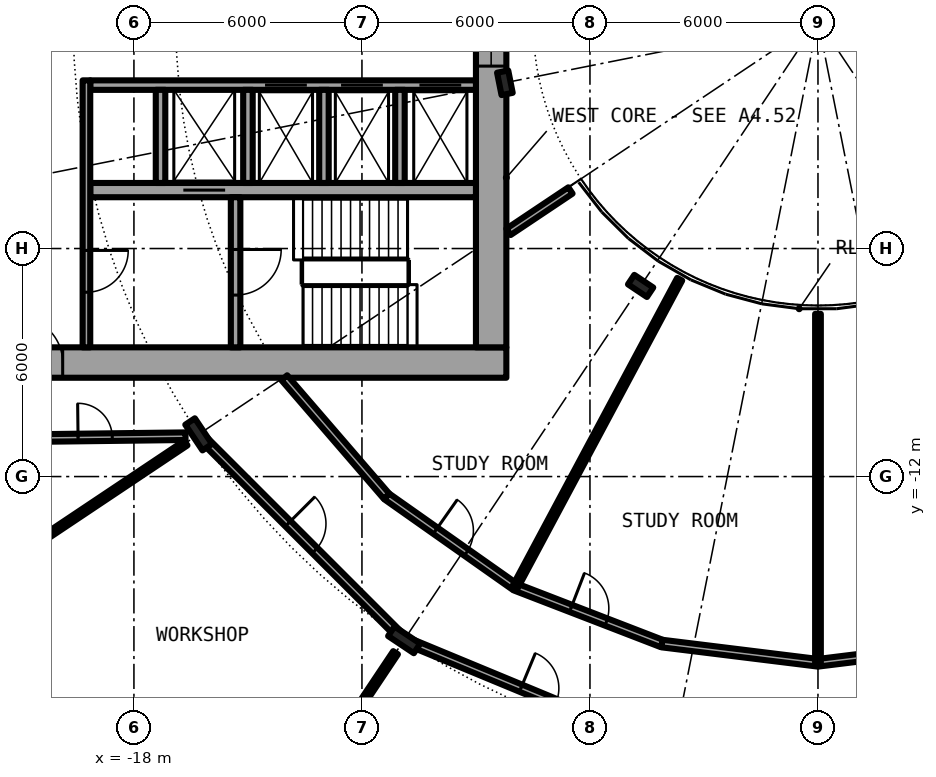
"""IFC4 building model, lengths in metres.
Left out: names, types, materials, properties, quantities, classifications, styles, units other than length and angle.
Written with IfcOpenShell. Run it as: python <this file> out.ifc"""

import sys

from ifc_helpers import new_model, si_unit, direction, frame, frame_2d, origin, origin_2d, place, context, subcontext, project, spatial, rectangle, i_section, extrude, element, fill, save


model = new_model("IFC4")
c1 = context("Model", 3, precision=1e-05, world=origin(), true_north=direction((0.0, 1.0)))
c2 = subcontext(c1, "Body", "Model", "MODEL_VIEW")
j1 = project(units=[si_unit("LENGTHUNIT", "METRE"), si_unit("PLANEANGLEUNIT", "RADIAN")], contexts=[c1])
p1 = place(None, origin())
s1 = spatial("IfcSite", under=j1, at=p1, CompositionType="ELEMENT")
p2 = place(p1, origin())
s2 = spatial("IfcBuilding", under=s1, at=p2, CompositionType="ELEMENT")
p3 = place(p2, frame((0.0, 0.0, 14.1)))
s3 = spatial("IfcBuildingStorey", under=s2, at=p3, CompositionType="ELEMENT", Elevation=14.1)
for number, where, z_axis, x_axis in (
    (1, (-16.297, -10.889, 0.0), (0.0, 0.0, 1.0), (-0.831, -0.556, 0.0)),
    (2, (-10.889, -16.297, 0.0), (0.0, 0.0, 1.0), (-0.556, -0.831, 0.0)),
):
    element("IfcColumn", number, at=place(p3, frame(where, z_axis=z_axis, x_axis=x_axis)), inside=s3, PredefinedType="COLUMN", context=c2, shape_type="SweptSolid", body=[
        extrude(i_section(OverallWidth=0.303, OverallDepth=0.814, WebThickness=0.021, FlangeThickness=0.04, FilletRadius=0.03, at=origin_2d()), origin(), (0.0, 0.0, 1.0), 4.2),
    ])
for number, where, z_axis, x_axis in (
    (3, (-8.239, -1.639, 0.0), (0.0, 0.0, 1.0), (-0.981, -0.195, 0.0)),
    (4, (-4.667, -6.984, 0.0), (0.0, 0.0, 1.0), (-0.556, -0.831, 0.0)),
):
    element("IfcColumn", number, at=place(p3, frame(where, z_axis=z_axis, x_axis=x_axis)), inside=s3, PredefinedType="COLUMN", context=c2, shape_type="SweptSolid", body=[
        extrude(i_section(OverallWidth=0.3, OverallDepth=0.6, WebThickness=0.015, FlangeThickness=0.03, FilletRadius=0.027, at=origin_2d()), origin(), (0.0, 0.0, 1.0), 4.2),
    ])
p4 = place(p3, frame((-22.4, -9.0, 0.0), z_axis=(0.0, 0.0, 1.0), x_axis=(1.0, 0.0, 0.0)))
e5 = element("IfcWall", 5, at=p4, inside=s3, PredefinedType="SHEAR", context=c2, shape_type="SweptSolid", body=[
    extrude(rectangle(XDim=14.2, YDim=0.8, at=frame_2d((7.1, 0.0))), origin(), (0.0, 0.0, 1.0), 4.2),
])
p5 = place(p4, frame((1.325, 0.0, 0.0)))
e6 = element("IfcOpeningElement", 6, at=p5, cuts=e5, PredefinedType="OPENING", context=c2, shape_type="SweptSolid", body=[
    extrude(rectangle(XDim=1.2, YDim=2.3, at=frame_2d((0.6, 1.15))), frame((0.0, 0.41, 0.0), z_axis=(0.0, -1.0, 0.0), x_axis=(1.0, 0.0, 0.0)), (0.0, 0.0, 1.0), 0.82),
])
p6 = place(p3, frame((-8.6, 8.6, 0.0), z_axis=(0.0, 0.0, 1.0), x_axis=(0.0, -1.0, 0.0)))
e7 = element("IfcWall", 7, at=p6, inside=s3, PredefinedType="SHEAR", context=c2, shape_type="SweptSolid", body=[
    extrude(rectangle(XDim=17.2, YDim=0.8, at=frame_2d((8.6, 0.0))), origin(), (0.0, 0.0, 1.0), 4.2),
])
p7 = place(p6, frame((7.4, 0.0, 0.1)))
e8 = element("IfcOpeningElement", 8, at=p7, cuts=e7, PredefinedType="OPENING", context=c2, shape_type="SweptSolid", body=[
    extrude(rectangle(XDim=2.4, YDim=2.2, at=frame_2d((1.2, 1.1))), frame((0.0, 0.41, 0.0), z_axis=(0.0, -1.0, 0.0), x_axis=(1.0, 0.0, 0.0)), (0.0, 0.0, 1.0), 0.82),
])
p8 = place(p3, frame((-9.0, -1.7, 0.0), z_axis=(0.0, 0.0, 1.0), x_axis=(-1.0, 0.0, 0.0)))
e9 = element("IfcWall", 9, at=p8, inside=s3, PredefinedType="SHEAR", context=c2, shape_type="SweptSolid", body=[
    extrude(rectangle(XDim=10.15, YDim=0.25, at=frame_2d((5.075, 0.0))), origin(), (0.0, 0.0, 1.0), 4.2),
])
p9 = place(p8, frame((0.387, 0.0, 0.0)))
e10 = element("IfcOpeningElement", 10, at=p9, cuts=e9, PredefinedType="OPENING", context=c2, shape_type="SweptSolid", body=[
    extrude(rectangle(XDim=1.1, YDim=2.3, at=frame_2d((0.55, 1.15))), frame((0.0, 0.135, 0.0), z_axis=(0.0, -1.0, 0.0), x_axis=(1.0, 0.0, 0.0)), (0.0, 0.0, 1.0), 0.27),
])
p10 = place(p8, frame((2.45, 0.0, 0.0)))
e11 = element("IfcOpeningElement", 11, at=p10, cuts=e9, PredefinedType="OPENING", context=c2, shape_type="SweptSolid", body=[
    extrude(rectangle(XDim=1.1, YDim=2.3, at=frame_2d((0.55, 1.15))), frame((0.0, 0.135, 0.0), z_axis=(0.0, -1.0, 0.0), x_axis=(1.0, 0.0, 0.0)), (0.0, 0.0, 1.0), 0.27),
])
p11 = place(p8, frame((4.45, 0.0, 0.0)))
e12 = element("IfcOpeningElement", 12, at=p11, cuts=e9, PredefinedType="OPENING", context=c2, shape_type="SweptSolid", body=[
    extrude(rectangle(XDim=1.1, YDim=2.3, at=frame_2d((0.55, 1.15))), frame((0.0, 0.135, 0.0), z_axis=(0.0, -1.0, 0.0), x_axis=(1.0, 0.0, 0.0)), (0.0, 0.0, 1.0), 0.27),
])
p12 = place(p3, frame((-9.0, -4.462, 0.0), z_axis=(0.0, 0.0, 1.0), x_axis=(-1.0, 0.0, 0.0)))
e13 = element("IfcWall", 13, at=p12, inside=s3, PredefinedType="SHEAR", context=c2, shape_type="SweptSolid", body=[
    extrude(rectangle(XDim=10.15, YDim=0.375, at=frame_2d((5.075, 0.0))), origin(), (0.0, 0.0, 1.0), 4.2),
])
p13 = place(p12, frame((6.6, 0.0, 0.0)))
e14 = element("IfcOpeningElement", 14, at=p13, cuts=e13, PredefinedType="OPENING", context=c2, shape_type="SweptSolid", body=[
    extrude(rectangle(XDim=1.1, YDim=2.3, at=frame_2d((0.55, 1.15))), frame((0.0, 0.198, 0.0), z_axis=(0.0, -1.0, 0.0), x_axis=(1.0, 0.0, 0.0)), (0.0, 0.0, 1.0), 0.395),
])
p14 = place(p3, frame((-15.325, -4.65, 0.0), z_axis=(0.0, 0.0, 1.0), x_axis=(0.0, -1.0, 0.0)))
e15 = element("IfcWall", 15, at=p14, inside=s3, PredefinedType="SHEAR", context=c2, shape_type="SweptSolid", body=[
    extrude(rectangle(XDim=3.95, YDim=0.25, at=frame_2d((1.975, 0.0))), origin(), (0.0, 0.0, 1.0), 4.2),
])
p15 = place(p14, frame((1.375, 0.0, 0.0)))
e16 = element("IfcOpeningElement", 16, at=p15, cuts=e15, PredefinedType="OPENING", context=c2, shape_type="SweptSolid", body=[
    extrude(rectangle(XDim=1.2, YDim=2.3, at=frame_2d((0.6, 1.15))), frame((0.0, 0.135, 0.0), z_axis=(0.0, -1.0, 0.0), x_axis=(1.0, 0.0, 0.0)), (0.0, 0.0, 1.0), 0.27),
])
for number, where, z_axis, x_axis in (
    (17, (-15.0, -1.825, 0.0), (0.0, 0.0, 1.0), (0.0, -1.0, 0.0)),
    (18, (-17.3, -1.825, 0.0), (0.0, 0.0, 1.0), (0.0, -1.0, 0.0)),
):
    element("IfcWall", number, at=place(p3, frame(where, z_axis=z_axis, x_axis=x_axis)), inside=s3, PredefinedType="SOLIDWALL", context=c2, shape_type="SweptSolid", body=[
        extrude(rectangle(XDim=2.45, YDim=0.25, at=frame_2d((1.225, 0.0))), origin(), (0.0, 0.0, 1.0), 3.8),
    ])
p16 = place(p3, frame((-19.25, -1.575, 0.0), z_axis=(0.0, 0.0, 1.0), x_axis=(0.0, -1.0, 0.0)))
e19 = element("IfcWall", 19, at=p16, inside=s3, PredefinedType="SOLIDWALL", context=c2, shape_type="SweptSolid", body=[
    extrude(rectangle(XDim=7.025, YDim=0.2, at=frame_2d((3.513, 0.0))), origin(), (0.0, 0.0, 1.0), 3.8),
])
p17 = place(p16, frame((4.475, 0.0, 0.0)))
e20 = element("IfcOpeningElement", 20, at=p17, cuts=e19, PredefinedType="OPENING", context=c2, shape_type="SweptSolid", body=[
    extrude(rectangle(XDim=1.1, YDim=2.3, at=frame_2d((0.55, 1.15))), frame((0.0, 0.11, 0.0), z_axis=(0.0, -1.0, 0.0), x_axis=(1.0, 0.0, 0.0)), (0.0, 0.0, 1.0), 0.22),
])
for number, where, z_axis, x_axis in (
    (21, (-11.0, -1.825, 0.0), (0.0, 0.0, 1.0), (0.0, -1.0, 0.0)),
    (22, (-13.0, -1.825, 0.0), (0.0, 0.0, 1.0), (0.0, -1.0, 0.0)),
):
    element("IfcWall", number, at=place(p3, frame(where, z_axis=z_axis, x_axis=x_axis)), inside=s3, PredefinedType="SOLIDWALL", context=c2, shape_type="SweptSolid", body=[
        extrude(rectangle(XDim=2.45, YDim=0.25, at=frame_2d((1.225, 0.0))), origin(), (0.0, 0.0, 1.0), 3.8),
    ])
p18 = place(p3, frame((-16.188, -10.998, 0.0), z_axis=(0.0, 0.0, 1.0), x_axis=(0.707106781187, -0.707106781187, 0.0)))
e23 = element("IfcWall", 23, at=p18, inside=s3, PredefinedType="PARTITIONING", context=c2, shape_type="SweptSolid", body=[
    extrude(rectangle(XDim=7.34, YDim=0.2, at=frame_2d((3.67, 0.0))), origin(), (0.0, 0.0, 1.0), 3.38),
])
p19 = place(p18, frame((3.17, 0.0, 0.0)))
e24 = element("IfcOpeningElement", 24, at=p19, cuts=e23, PredefinedType="OPENING", context=c2, shape_type="SweptSolid", body=[
    extrude(rectangle(XDim=1.0, YDim=2.3, at=frame_2d((0.5, 1.15))), frame((0.0, 0.11, 0.0), z_axis=(0.0, -1.0, 0.0), x_axis=(1.0, 0.0, 0.0)), (0.0, 0.0, 1.0), 0.22),
])
p20 = place(p3, frame((-10.747, -16.356, 0.0), z_axis=(0.0, 0.0, 1.0), x_axis=(0.923912243701, -0.382604451019, 0.0)))
e25 = element("IfcWall", 25, at=p20, inside=s3, PredefinedType="PARTITIONING", context=c2, shape_type="SweptSolid", body=[
    extrude(rectangle(XDim=7.339, YDim=0.2, at=frame_2d((3.67, 0.0))), origin(), (0.0, 0.0, 1.0), 3.38),
])
p21 = place(p20, frame((3.17, 0.0, 0.0)))
e26 = element("IfcOpeningElement", 26, at=p21, cuts=e25, PredefinedType="OPENING", context=c2, shape_type="SweptSolid", body=[
    extrude(rectangle(XDim=1.0, YDim=2.3, at=frame_2d((0.5, 1.15))), frame((0.0, 0.11, 0.0), z_axis=(0.0, -1.0, 0.0), x_axis=(1.0, 0.0, 0.0)), (0.0, 0.0, 1.0), 0.22),
])
p22 = place(p3, frame((-14.043, -9.4, 0.0), z_axis=(0.0, 0.0, 1.0), x_axis=(0.653274518104, -0.757121129012, 0.0)))
e27 = element("IfcWall", 27, at=p22, inside=s3, PredefinedType="PARTITIONING", context=c2, shape_type="SweptSolid", body=[
    extrude(rectangle(XDim=4.124, YDim=0.2, at=frame_2d((2.062, 0.0))), origin(), (0.0, 0.0, 1.0), 3.8),
])
p23 = place(p3, frame((-11.349, -12.522, 0.0), z_axis=(0.0, 0.0, 1.0), x_axis=(0.817567680547, -0.575832517079, 0.0)))
e28 = element("IfcWall", 28, at=p23, inside=s3, PredefinedType="PARTITIONING", context=c2, shape_type="SweptSolid", body=[
    extrude(rectangle(XDim=4.137, YDim=0.2, at=frame_2d((2.068, 0.0))), origin(), (0.0, 0.0, 1.0), 3.8),
])
p24 = place(p23, frame((1.568, 0.0, 0.0)))
e29 = element("IfcOpeningElement", 29, at=p24, cuts=e28, PredefinedType="OPENING", context=c2, shape_type="SweptSolid", body=[
    extrude(rectangle(XDim=1.0, YDim=2.3, at=frame_2d((0.5, 1.15))), frame((0.0, 0.11, 0.0), z_axis=(0.0, -1.0, 0.0), x_axis=(1.0, 0.0, 0.0)), (0.0, 0.0, 1.0), 0.22),
])
p25 = place(p3, frame((-7.967, -14.904, 0.0), z_axis=(0.0, 0.0, 1.0), x_axis=(0.932943640288, -0.360022449363, 0.0)))
e30 = element("IfcWall", 30, at=p25, inside=s3, PredefinedType="PARTITIONING", context=c2, shape_type="SweptSolid", body=[
    extrude(rectangle(XDim=4.139, YDim=0.2, at=frame_2d((2.069, 0.0))), origin(), (0.0, 0.0, 1.0), 3.8),
])
p26 = place(p25, frame((1.569, 0.0, 0.0)))
e31 = element("IfcOpeningElement", 31, at=p26, cuts=e30, PredefinedType="OPENING", context=c2, shape_type="SweptSolid", body=[
    extrude(rectangle(XDim=1.0, YDim=2.3, at=frame_2d((0.5, 1.15))), frame((0.0, 0.11, 0.0), z_axis=(0.0, -1.0, 0.0), x_axis=(1.0, 0.0, 0.0)), (0.0, 0.0, 1.0), 0.22),
])
for number, where, z_axis, x_axis in (
    (32, (-4.106, -16.394, 0.0), (0.0, 0.0, 1.0), (0.992, -0.122, 0.0)),
    (33, (0.0, -16.9, 0.0), (0.0, 0.0, 1.0), (0.992, 0.122, 0.0)),
):
    element("IfcWall", number, at=place(p3, frame(where, z_axis=z_axis, x_axis=x_axis)), inside=s3, PredefinedType="PARTITIONING", context=c2, shape_type="SweptSolid", body=[
        extrude(rectangle(XDim=4.137, YDim=0.2, at=frame_2d((2.068, 0.0))), origin(), (0.0, 0.0, 1.0), 3.8),
    ])
p27 = place(p3, frame((-21.675, -11.0, 0.0), z_axis=(0.0, 0.0, 1.0), x_axis=(0.999924074118, 0.012322580895, 0.0)))
e34 = element("IfcWall", 34, at=p27, inside=s3, PredefinedType="PARTITIONING", context=c2, shape_type="SweptSolid", body=[
    extrude(rectangle(XDim=5.032, YDim=0.2, at=frame_2d((2.516, 0.0))), origin(), (0.0, 0.0, 1.0), 3.8),
])
p28 = place(p27, frame((2.205, 0.0, 0.0)))
e35 = element("IfcOpeningElement", 35, at=p28, cuts=e34, PredefinedType="OPENING", context=c2, shape_type="SweptSolid", body=[
    extrude(rectangle(XDim=0.9, YDim=2.3, at=frame_2d((0.45, 1.15))), frame((0.0, 0.11, 0.0), z_axis=(0.0, -1.0, 0.0), x_axis=(1.0, 0.0, 0.0)), (0.0, 0.0, 1.0), 0.22),
])
p29 = place(p3, frame((-6.513, -4.472, 0.0), z_axis=(0.0, 0.0, 1.0), x_axis=(-0.831417956244, -0.555647533996, 0.0)))
e36 = element("IfcWall", 36, at=p29, inside=s3, PredefinedType="PARTITIONING", context=c2, shape_type="SweptSolid", body=[
    extrude(rectangle(XDim=1.962, YDim=0.2, at=frame_2d((0.981, 0.0))), origin(), (0.0, 0.0, 1.0), 3.8),
])
p30 = place(p3, frame((-22.593, -15.101, 0.0), z_axis=(0.0, 0.0, 1.0), x_axis=(0.831415754305, 0.555650828752, 0.0)))
e37 = element("IfcWall", 37, at=p30, inside=s3, PredefinedType="PARTITIONING", context=c2, shape_type="SweptSolid", body=[
    extrude(rectangle(XDim=7.168, YDim=0.15, at=frame_2d((3.584, 0.0))), origin(), (0.0, 0.0, 1.0), 3.8),
])
p31 = place(p3, frame((-15.098, -22.595, 0.0), z_axis=(0.0, 0.0, 1.0), x_axis=(0.555627285648, 0.831431488123, 0.0)))
e38 = element("IfcWall", 38, at=p31, inside=s3, PredefinedType="PARTITIONING", context=c2, shape_type="SweptSolid", body=[
    extrude(rectangle(XDim=7.168, YDim=0.15, at=frame_2d((3.584, 0.0))), origin(), (0.0, 0.0, 1.0), 3.8),
])
p32 = place(p3, frame((-7.967, -14.904, 0.0), z_axis=(0.0, 0.0, 1.0), x_axis=(0.471460365694, 0.881887251059, 0.0)))
e39 = element("IfcWall", 39, at=p32, inside=s3, PredefinedType="PARTITIONING", context=c2, shape_type="SweptSolid", body=[
    extrude(rectangle(XDim=9.18, YDim=0.15, at=frame_2d((4.59, 0.0))), origin(), (0.0, 0.0, 1.0), 3.8),
])
p33 = place(p3, frame((0.0, -16.9, 0.0), z_axis=(0.0, 0.0, 1.0), x_axis=(0.0, 1.0, 0.0)))
e40 = element("IfcWall", 40, at=p33, inside=s3, PredefinedType="PARTITIONING", context=c2, shape_type="SweptSolid", body=[
    extrude(rectangle(XDim=9.18, YDim=0.15, at=frame_2d((4.59, 0.0))), origin(), (0.0, 0.0, 1.0), 3.8),
])
p34 = place(p9, origin())
e41 = element("IfcDoor", 41, at=p34, inside=s3, OperationType="DOUBLE_DOOR_SLIDING", PredefinedType="DOOR", context=c2, shape_type="SweptSolid", body=[
    extrude(rectangle(XDim=1.1, YDim=2.3, at=frame_2d((0.55, 1.15))), frame((0.0, 0.025, 0.0), z_axis=(0.0, -1.0, 0.0), x_axis=(1.0, 0.0, 0.0)), (0.0, 0.0, 1.0), 0.05),
])
fill(e10, e41)
p35 = place(p10, origin())
e42 = element("IfcDoor", 42, at=p35, inside=s3, OperationType="DOUBLE_DOOR_SLIDING", PredefinedType="DOOR", context=c2, shape_type="SweptSolid", body=[
    extrude(rectangle(XDim=1.1, YDim=2.3, at=frame_2d((0.55, 1.15))), frame((0.0, 0.025, 0.0), z_axis=(0.0, -1.0, 0.0), x_axis=(1.0, 0.0, 0.0)), (0.0, 0.0, 1.0), 0.05),
])
fill(e11, e42)
p36 = place(p11, origin())
e43 = element("IfcDoor", 43, at=p36, inside=s3, OperationType="DOUBLE_DOOR_SLIDING", PredefinedType="DOOR", context=c2, shape_type="SweptSolid", body=[
    extrude(rectangle(XDim=1.1, YDim=2.3, at=frame_2d((0.55, 1.15))), frame((0.0, 0.025, 0.0), z_axis=(0.0, -1.0, 0.0), x_axis=(1.0, 0.0, 0.0)), (0.0, 0.0, 1.0), 0.05),
])
fill(e12, e43)
p37 = place(p13, origin())
e44 = element("IfcDoor", 44, at=p37, inside=s3, OperationType="DOUBLE_DOOR_SLIDING", PredefinedType="DOOR", context=c2, shape_type="SweptSolid", body=[
    extrude(rectangle(XDim=1.1, YDim=2.3, at=frame_2d((0.55, 1.15))), frame((0.0, 0.025, 0.0), z_axis=(0.0, -1.0, 0.0), x_axis=(1.0, 0.0, 0.0)), (0.0, 0.0, 1.0), 0.05),
])
fill(e14, e44)
p38 = place(p15, origin())
e45 = element("IfcDoor", 45, at=p38, inside=s3, OperationType="SINGLE_SWING_LEFT", PredefinedType="DOOR", context=c2, shape_type="SweptSolid", body=[
    extrude(rectangle(XDim=1.2, YDim=2.3, at=frame_2d((0.6, 1.15))), frame((0.0, 0.025, 0.0), z_axis=(0.0, -1.0, 0.0), x_axis=(1.0, 0.0, 0.0)), (0.0, 0.0, 1.0), 0.05),
])
fill(e16, e45)
p39 = place(p17, origin())
e46 = element("IfcDoor", 46, at=p39, inside=s3, OperationType="SINGLE_SWING_LEFT", PredefinedType="DOOR", context=c2, shape_type="SweptSolid", body=[
    extrude(rectangle(XDim=1.1, YDim=2.3, at=frame_2d((0.55, 1.15))), frame((0.0, 0.025, 0.0), z_axis=(0.0, -1.0, 0.0), x_axis=(1.0, 0.0, 0.0)), (0.0, 0.0, 1.0), 0.05),
])
fill(e20, e46)
p40 = place(p5, origin())
e47 = element("IfcDoor", 47, at=p40, inside=s3, OperationType="SINGLE_SWING_RIGHT", PredefinedType="DOOR", context=c2, shape_type="SweptSolid", body=[
    extrude(rectangle(XDim=1.2, YDim=2.3, at=frame_2d((0.6, 1.15))), frame((0.0, 0.025, 0.0), z_axis=(0.0, -1.0, 0.0), x_axis=(1.0, 0.0, 0.0)), (0.0, 0.0, 1.0), 0.05),
])
fill(e6, e47)
p41 = place(p7, origin())
e48 = element("IfcWindow", 48, at=p41, inside=s3, PartitioningType="SINGLE_PANEL", PredefinedType="WINDOW", context=c2, shape_type="SweptSolid", body=[
    extrude(rectangle(XDim=2.4, YDim=2.2, at=frame_2d((1.2, 1.1))), frame((0.0, 0.03, 0.0), z_axis=(0.0, -1.0, 0.0), x_axis=(1.0, 0.0, 0.0)), (0.0, 0.0, 1.0), 0.06),
])
fill(e8, e48)
p42 = place(p19, origin())
e49 = element("IfcDoor", 49, at=p42, inside=s3, OperationType="SINGLE_SWING_RIGHT", PredefinedType="DOOR", context=c2, shape_type="SweptSolid", body=[
    extrude(rectangle(XDim=1.0, YDim=2.3, at=frame_2d((0.5, 1.15))), frame((0.0, 0.025, 0.0), z_axis=(0.0, -1.0, 0.0), x_axis=(1.0, 0.0, 0.0)), (0.0, 0.0, 1.0), 0.05),
])
fill(e24, e49)
p43 = place(p21, origin())
e50 = element("IfcDoor", 50, at=p43, inside=s3, OperationType="SINGLE_SWING_RIGHT", PredefinedType="DOOR", context=c2, shape_type="SweptSolid", body=[
    extrude(rectangle(XDim=1.0, YDim=2.3, at=frame_2d((0.5, 1.15))), frame((0.0, 0.025, 0.0), z_axis=(0.0, -1.0, 0.0), x_axis=(1.0, 0.0, 0.0)), (0.0, 0.0, 1.0), 0.05),
])
fill(e26, e50)
p44 = place(p24, origin())
e51 = element("IfcDoor", 51, at=p44, inside=s3, OperationType="SINGLE_SWING_RIGHT", PredefinedType="DOOR", context=c2, shape_type="SweptSolid", body=[
    extrude(rectangle(XDim=1.0, YDim=2.3, at=frame_2d((0.5, 1.15))), frame((0.0, 0.025, 0.0), z_axis=(0.0, -1.0, 0.0), x_axis=(1.0, 0.0, 0.0)), (0.0, 0.0, 1.0), 0.05),
])
fill(e29, e51)
p45 = place(p26, origin())
e52 = element("IfcDoor", 52, at=p45, inside=s3, OperationType="SINGLE_SWING_LEFT", PredefinedType="DOOR", context=c2, shape_type="SweptSolid", body=[
    extrude(rectangle(XDim=1.0, YDim=2.3, at=frame_2d((0.5, 1.15))), frame((0.0, 0.025, 0.0), z_axis=(0.0, -1.0, 0.0), x_axis=(1.0, 0.0, 0.0)), (0.0, 0.0, 1.0), 0.05),
])
fill(e31, e52)
p46 = place(p28, origin())
e53 = element("IfcDoor", 53, at=p46, inside=s3, OperationType="SINGLE_SWING_RIGHT", PredefinedType="DOOR", context=c2, shape_type="SweptSolid", body=[
    extrude(rectangle(XDim=0.9, YDim=2.3, at=frame_2d((0.45, 1.15))), frame((0.0, 0.025, 0.0), z_axis=(0.0, -1.0, 0.0), x_axis=(1.0, 0.0, 0.0)), (0.0, 0.0, 1.0), 0.05),
])
fill(e35, e53)
save(model, sys.argv[1])
